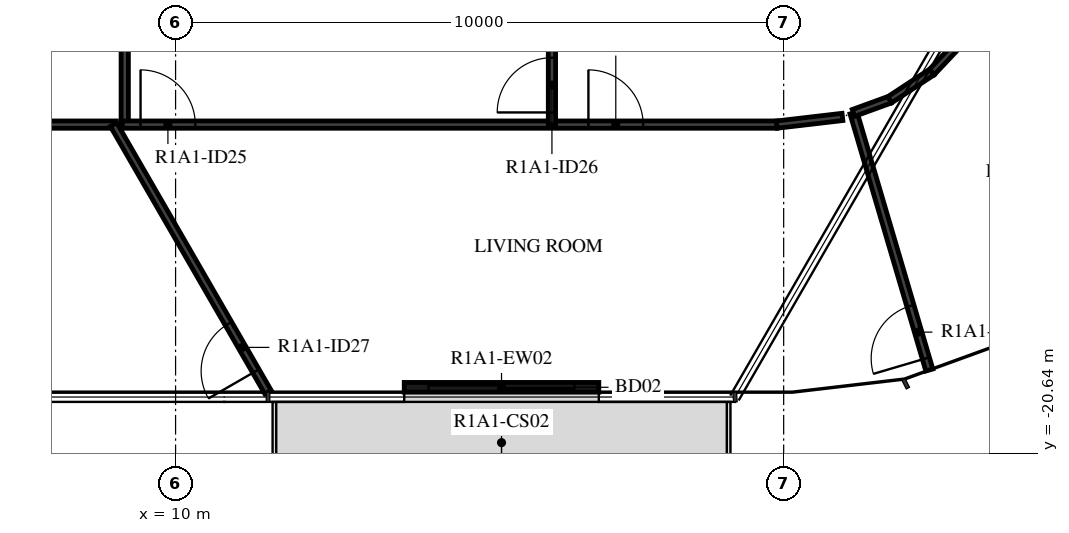
"""IFC4 building model, lengths in metres.
Left out: names, types, materials, properties, quantities, classifications, styles, units other than length and angle.
Written with IfcOpenShell. Run it as: python <this file> out.ifc"""

import sys

from ifc_helpers import new_model, si_unit, direction, frame, frame_2d, origin, place, context, subcontext, project, spatial, rectangle, extrude, element, fill, save


model = new_model("IFC4")
c1 = context("Model", 3, precision=1e-05, world=origin(), true_north=direction((0.0, 1.0)))
c2 = subcontext(c1, "Body", "Model", "MODEL_VIEW")
j1 = project(units=[si_unit("LENGTHUNIT", "METRE"), si_unit("PLANEANGLEUNIT", "RADIAN")], contexts=[c1])
p1 = place(None, origin())
s1 = spatial("IfcSite", under=j1, at=p1, CompositionType="ELEMENT")
p2 = place(p1, origin())
s2 = spatial("IfcBuilding", under=s1, at=p2, CompositionType="ELEMENT")
p3 = place(p2, frame((0.0, 0.0, 41.9)))
s3 = spatial("IfcBuildingStorey", under=s2, at=p3, CompositionType="ELEMENT", Elevation=41.9)
p4 = place(p3, frame((13.76, -19.55, 0.0), z_axis=(0.0, 0.0, 1.0), x_axis=(1.0, 0.0, 0.0)))
e1 = element("IfcWall", 1, at=p4, inside=s3, PredefinedType="STANDARD", context=c2, shape_type="SweptSolid", body=[
    extrude(rectangle(XDim=3.2, YDim=0.16, at=frame_2d((1.6, 0.0))), origin(), (0.0, 0.0, 1.0), 3.12),
])
p5 = place(p4, frame((0.4, 0.0, 0.0)))
e2 = element("IfcOpeningElement", 2, at=p5, cuts=e1, PredefinedType="OPENING", context=c2, shape_type="SweptSolid", body=[
    extrude(rectangle(XDim=2.4, YDim=2.4, at=frame_2d((1.2, 1.2))), frame((0.0, 0.09, 0.0), z_axis=(0.0, -1.0, 0.0), x_axis=(1.0, 0.0, 0.0)), (0.0, 0.0, 1.0), 0.18),
])
p6 = place(p3, frame((27.025, -15.603, 0.0), z_axis=(0.0, 0.0, 1.0), x_axis=(-0.866030653443, 0.499990907215, 0.0)))
e3 = element("IfcWall", 3, at=p6, inside=s3, PredefinedType="STANDARD", context=c2, shape_type="SweptSolid", body=[
    extrude(rectangle(XDim=6.271, YDim=0.2, at=frame_2d((3.136, 0.0))), origin(), (0.0, 0.0, 1.0), 3.12),
])
p7 = place(p3, frame((2.139, -15.23, 0.0), z_axis=(0.0, 0.0, 1.0), x_axis=(1.0, 0.0, 0.0)))
e4 = element("IfcWall", 4, at=p7, inside=s3, PredefinedType="PARTITIONING", context=c2, shape_type="SweptSolid", body=[
    extrude(rectangle(XDim=6.887, YDim=0.12, at=frame_2d((3.444, 0.0))), origin(), (0.0, 0.0, 1.0), 3.12),
])
p8 = place(p3, frame((4.073, -15.2, 0.0), z_axis=(0.0, 0.0, 1.0), x_axis=(0.866034128446, 0.499984888139, 0.0)))
e5 = element("IfcWall", 5, at=p8, inside=s3, PredefinedType="PARTITIONING", context=c2, shape_type="SweptSolid", body=[
    extrude(rectangle(XDim=5.879, YDim=0.12, at=frame_2d((2.939, 0.0))), origin(), (0.0, 0.0, 1.0), 3.12),
])
p9 = place(p8, frame((1.4, 0.0, 0.0)))
e6 = element("IfcOpeningElement", 6, at=p9, cuts=e5, PredefinedType="OPENING", context=c2, shape_type="SweptSolid", body=[
    extrude(rectangle(XDim=0.8, YDim=2.1, at=frame_2d((0.4, 1.05))), frame((0.0, 0.07, 0.0), z_axis=(0.0, -1.0, 0.0), x_axis=(1.0, 0.0, 0.0)), (0.0, 0.0, 1.0), 0.14),
])
p10 = place(p3, frame((9.164, -12.261, 0.0), z_axis=(0.0, 0.0, 1.0), x_axis=(0.0, -1.0, 0.0)))
e7 = element("IfcWall", 7, at=p10, inside=s3, PredefinedType="PARTITIONING", context=c2, shape_type="SweptSolid", body=[
    extrude(rectangle(XDim=2.969, YDim=0.12, at=frame_2d((1.485, 0.0))), origin(), (0.0, 0.0, 1.0), 3.12),
])
p11 = place(p3, frame((9.124, -15.23, 0.0), z_axis=(0.0, 0.0, 1.0), x_axis=(1.0, 0.0, 0.0)))
e8 = element("IfcWall", 8, at=p11, inside=s3, PredefinedType="PARTITIONING", context=c2, shape_type="SweptSolid", body=[
    extrude(rectangle(XDim=10.764, YDim=0.12, at=frame_2d((5.382, 0.0))), origin(), (0.0, 0.0, 1.0), 3.12),
])
p12 = place(p11, frame((0.3, 0.0, 0.0)))
e9 = element("IfcOpeningElement", 9, at=p12, cuts=e8, PredefinedType="OPENING", context=c2, shape_type="SweptSolid", body=[
    extrude(rectangle(XDim=0.9, YDim=2.1, at=frame_2d((0.45, 1.05))), frame((0.0, 0.07, 0.0), z_axis=(0.0, -1.0, 0.0), x_axis=(1.0, 0.0, 0.0)), (0.0, 0.0, 1.0), 0.14),
])
p13 = place(p11, frame((7.665, 0.0, 0.0)))
e10 = element("IfcOpeningElement", 10, at=p13, cuts=e8, PredefinedType="OPENING", context=c2, shape_type="SweptSolid", body=[
    extrude(rectangle(XDim=0.9, YDim=2.1, at=frame_2d((0.45, 1.05))), frame((0.0, 0.07, 0.0), z_axis=(0.0, -1.0, 0.0), x_axis=(1.0, 0.0, 0.0)), (0.0, 0.0, 1.0), 0.14),
])
p14 = place(p3, frame((16.189, -15.23, 0.0), z_axis=(0.0, 0.0, 1.0), x_axis=(0.0, 1.0, 0.0)))
e11 = element("IfcWall", 11, at=p14, inside=s3, PredefinedType="PARTITIONING", context=c2, shape_type="SweptSolid", body=[
    extrude(rectangle(XDim=5.883, YDim=0.12, at=frame_2d((2.942, 0.0))), origin(), (0.0, 0.0, 1.0), 3.12),
])
p15 = place(p14, frame((0.2, 0.0, 0.0)))
e12 = element("IfcOpeningElement", 12, at=p15, cuts=e11, PredefinedType="OPENING", context=c2, shape_type="SweptSolid", body=[
    extrude(rectangle(XDim=0.9, YDim=2.1, at=frame_2d((0.45, 1.05))), frame((0.0, 0.07, 0.0), z_axis=(0.0, -1.0, 0.0), x_axis=(1.0, 0.0, 0.0)), (0.0, 0.0, 1.0), 0.14),
])
p16 = place(p3, frame((11.52, -19.63, 0.0), z_axis=(0.0, 0.0, 1.0), x_axis=(-0.499999763888, 0.866025540104, 0.0)))
e13 = element("IfcWall", 13, at=p16, inside=s3, PredefinedType="PARTITIONING", context=c2, shape_type="SweptSolid", body=[
    extrude(rectangle(XDim=5.081, YDim=0.12, at=frame_2d((2.54, 0.0))), origin(), (0.0, 0.0, 1.0), 3.12),
])
p17 = place(p16, frame((0.4, 0.0, 0.0)))
e14 = element("IfcOpeningElement", 14, at=p17, cuts=e13, PredefinedType="OPENING", context=c2, shape_type="SweptSolid", body=[
    extrude(rectangle(XDim=0.9, YDim=2.1, at=frame_2d((0.45, 1.05))), frame((0.0, 0.07, 0.0), z_axis=(0.0, -1.0, 0.0), x_axis=(1.0, 0.0, 0.0)), (0.0, 0.0, 1.0), 0.14),
])
p18 = place(p3, frame((20.967, -15.104, 0.0), z_axis=(0.0, 0.0, 1.0), x_axis=(-0.993231641151, -0.116150363826, 0.0)))
e15 = element("IfcWall", 15, at=p18, inside=s3, PredefinedType="PARTITIONING", context=c2, shape_type="SweptSolid", body=[
    extrude(rectangle(XDim=1.087, YDim=0.12, at=frame_2d((0.543, 0.0))), origin(), (0.0, 0.0, 1.0), 3.12),
])
p19 = place(p3, frame((22.396, -19.266, 0.0), z_axis=(0.0, 0.0, 1.0), x_axis=(-0.282873823334, 0.959157130022, 0.0)))
e16 = element("IfcWall", 16, at=p19, inside=s3, PredefinedType="PARTITIONING", context=c2, shape_type="SweptSolid", body=[
    extrude(rectangle(XDim=4.409, YDim=0.12, at=frame_2d((2.204, 0.0))), origin(), (0.0, 0.0, 1.0), 3.12),
])
p20 = place(p19, frame((0.2, 0.0, 0.0)))
e17 = element("IfcOpeningElement", 17, at=p20, cuts=e16, PredefinedType="OPENING", context=c2, shape_type="SweptSolid", body=[
    extrude(rectangle(XDim=0.9, YDim=2.1, at=frame_2d((0.45, 1.05))), frame((0.0, 0.07, 0.0), z_axis=(0.0, -1.0, 0.0), x_axis=(1.0, 0.0, 0.0)), (0.0, 0.0, 1.0), 0.14),
])
p21 = place(p3, frame((21.149, -15.038, 0.0), z_axis=(0.0, 0.0, 1.0), x_axis=(0.939726102094, 0.341928140173, 0.0)))
e18 = element("IfcWall", 18, at=p21, inside=s3, PredefinedType="PARTITIONING", context=c2, shape_type="SweptSolid", body=[
    extrude(rectangle(XDim=0.635, YDim=0.12, at=frame_2d((0.318, 0.0))), origin(), (0.0, 0.0, 1.0), 3.12),
])
p22 = place(p3, frame((21.746, -14.82, 0.0), z_axis=(0.0, 0.0, 1.0), x_axis=(0.835477570013, 0.549524549046, 0.0)))
e19 = element("IfcWall", 19, at=p22, inside=s3, PredefinedType="PARTITIONING", context=c2, shape_type="SweptSolid", body=[
    extrude(rectangle(XDim=0.829, YDim=0.12, at=frame_2d((0.415, 0.0))), origin(), (0.0, 0.0, 1.0), 3.12),
])
p23 = place(p3, frame((22.438, -14.365, 0.0), z_axis=(0.0, 0.0, 1.0), x_axis=(0.686182189596, 0.727429723535, 0.0)))
e20 = element("IfcWall", 20, at=p23, inside=s3, PredefinedType="PARTITIONING", context=c2, shape_type="SweptSolid", body=[
    extrude(rectangle(XDim=0.829, YDim=0.12, at=frame_2d((0.414, 0.0))), origin(), (0.0, 0.0, 1.0), 3.12),
])
p24 = place(p5, origin())
e21 = element("IfcDoor", 21, at=p24, inside=s3, OperationType="DOUBLE_DOOR_SLIDING", PredefinedType="DOOR", context=c2, shape_type="SweptSolid", body=[
    extrude(rectangle(XDim=2.4, YDim=2.4, at=frame_2d((1.2, 1.2))), frame((0.0, 0.025, 0.0), z_axis=(0.0, -1.0, 0.0), x_axis=(1.0, 0.0, 0.0)), (0.0, 0.0, 1.0), 0.05),
])
fill(e2, e21)
p25 = place(p12, origin())
e22 = element("IfcDoor", 22, at=p25, inside=s3, OperationType="SINGLE_SWING_RIGHT", PredefinedType="DOOR", context=c2, shape_type="SweptSolid", body=[
    extrude(rectangle(XDim=0.9, YDim=2.1, at=frame_2d((0.45, 1.05))), frame((0.0, 0.025, 0.0), z_axis=(0.0, -1.0, 0.0), x_axis=(1.0, 0.0, 0.0)), (0.0, 0.0, 1.0), 0.05),
])
fill(e9, e22)
p26 = place(p15, origin())
e23 = element("IfcDoor", 23, at=p26, inside=s3, OperationType="SINGLE_SWING_RIGHT", PredefinedType="DOOR", context=c2, shape_type="SweptSolid", body=[
    extrude(rectangle(XDim=0.9, YDim=2.1, at=frame_2d((0.45, 1.05))), frame((0.0, 0.025, 0.0), z_axis=(0.0, -1.0, 0.0), x_axis=(1.0, 0.0, 0.0)), (0.0, 0.0, 1.0), 0.05),
])
fill(e12, e23)
p27 = place(p17, origin())
e24 = element("IfcDoor", 24, at=p27, inside=s3, OperationType="SINGLE_SWING_LEFT", PredefinedType="DOOR", context=c2, shape_type="SweptSolid", body=[
    extrude(rectangle(XDim=0.9, YDim=2.1, at=frame_2d((0.45, 1.05))), frame((0.0, 0.025, 0.0), z_axis=(0.0, -1.0, 0.0), x_axis=(1.0, 0.0, 0.0)), (0.0, 0.0, 1.0), 0.05),
])
fill(e14, e24)
p28 = place(p20, origin())
e25 = element("IfcDoor", 25, at=p28, inside=s3, OperationType="SINGLE_SWING_RIGHT", PredefinedType="DOOR", context=c2, shape_type="SweptSolid", body=[
    extrude(rectangle(XDim=0.9, YDim=2.1, at=frame_2d((0.45, 1.05))), frame((0.0, 0.025, 0.0), z_axis=(0.0, -1.0, 0.0), x_axis=(1.0, 0.0, 0.0)), (0.0, 0.0, 1.0), 0.05),
])
fill(e17, e25)
p29 = place(p13, origin())
e26 = element("IfcDoor", 26, at=p29, inside=s3, OperationType="SINGLE_SWING_LEFT", PredefinedType="DOOR", context=c2, shape_type="SweptSolid", body=[
    extrude(rectangle(XDim=0.9, YDim=2.1, at=frame_2d((0.45, 1.05))), frame((0.0, 0.025, 0.0), z_axis=(0.0, -1.0, 0.0), x_axis=(1.0, 0.0, 0.0)), (0.0, 0.0, 1.0), 0.05),
])
fill(e10, e26)
save(model, sys.argv[1])
